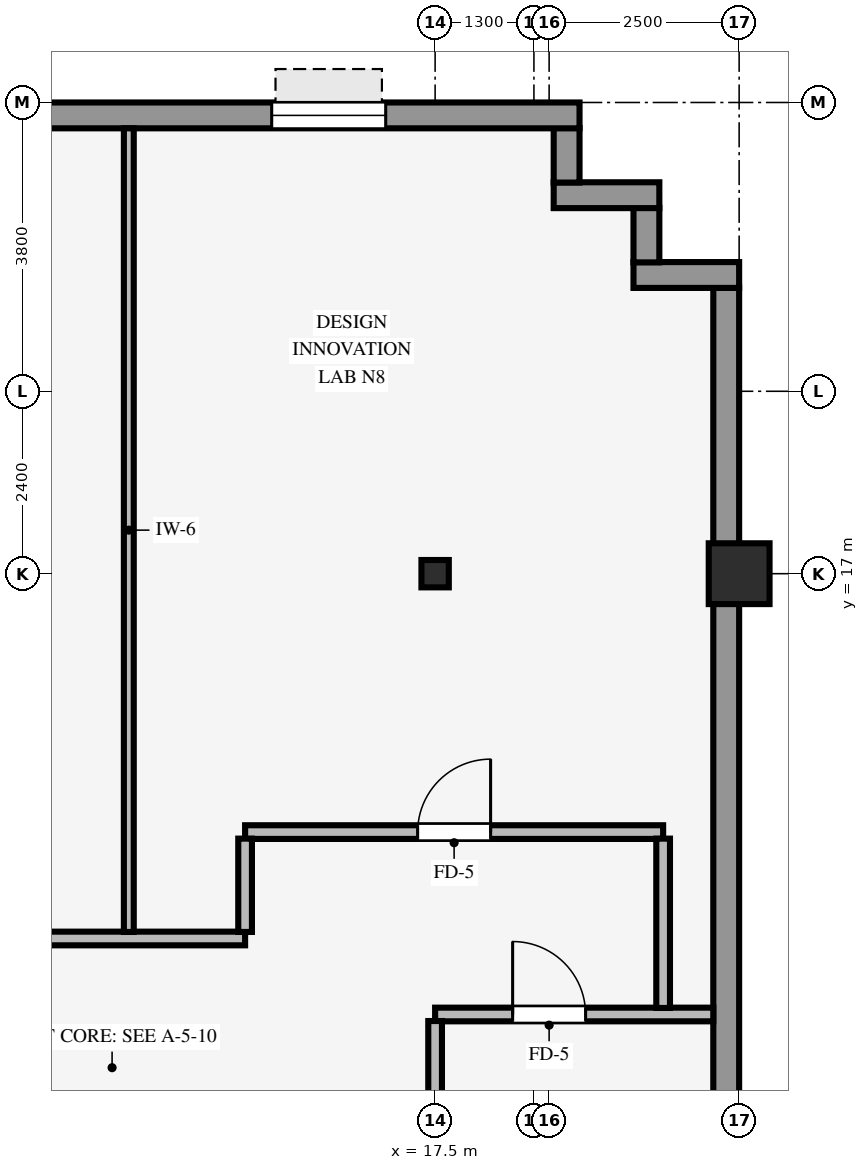
"""IFC4 building model, lengths in metres.
Left out: names, types, materials, properties, quantities, classifications, styles, units other than length and angle.
Written with IfcOpenShell. Run it as: python <this file> out.ifc"""

import sys

from ifc_helpers import new_model, si_unit, direction, frame, frame_2d, origin, origin_2d, place, context, subcontext, project, spatial, rectangle, hollow_rectangle, i_section, extrude, source, transform, mapped, element, fill, save


model = new_model("IFC4")
c1 = context("Model", 3, precision=1e-05, world=origin(), true_north=direction((0.0, 1.0)))
c2 = subcontext(c1, "Body", "Model", "MODEL_VIEW")
j1 = project(units=[si_unit("LENGTHUNIT", "METRE"), si_unit("PLANEANGLEUNIT", "RADIAN")], contexts=[c1])
p1 = place(None, origin())
s1 = spatial("IfcSite", under=j1, at=p1, CompositionType="ELEMENT")
p2 = place(p1, origin())
s2 = spatial("IfcBuilding", under=s1, at=p2, CompositionType="ELEMENT")
p3 = place(p2, frame((0.0, 0.0, 60.45)))
s3 = spatial("IfcBuildingStorey", under=s2, at=p3, CompositionType="ELEMENT", Elevation=60.45)
p4 = place(p3, frame((21.5, 17.0, 0.0), z_axis=(0.0, 0.0, 1.0), x_axis=(1.0, 0.0, 0.0)))
e1 = element("IfcColumn", 1, at=p4, inside=s3, PredefinedType="COLUMN", context=c2, shape_type="SweptSolid", body=[
    extrude(hollow_rectangle(XDim=0.8, YDim=0.8, WallThickness=0.055, InnerFilletRadius=0.055, OuterFilletRadius=0.11, at=origin_2d()), origin(), (0.0, 0.0, 1.0), 3.37),
])
p5 = place(p3, frame((17.5, 17.0, 0.0), z_axis=(0.0, 0.0, 1.0), x_axis=(1.0, 0.0, 0.0)))
e2 = element("IfcColumn", 2, at=p5, inside=s3, PredefinedType="COLUMN", context=c2, shape_type="SweptSolid", body=[
    extrude(i_section(OverallWidth=0.36, OverallDepth=0.36, WebThickness=0.021, FlangeThickness=0.021, FilletRadius=0.018, at=origin_2d()), origin(), (0.0, 0.0, 1.0), 3.37),
])
p6 = place(p3, frame((21.33, -20.764, 0.0), z_axis=(0.0, 0.0, 1.0), x_axis=(0.0, 1.0, 0.0)))
e3 = element("IfcWall", 3, at=p6, inside=s3, PredefinedType="STANDARD", context=c2, shape_type="SweptSolid", body=[
    extrude(rectangle(XDim=41.528, YDim=0.34, at=frame_2d((20.764, 0.0))), origin(), (0.0, 0.0, 1.0), 2.705),
])
p7 = place(p6, frame((12.202, 0.0, 0.8)))
e4 = element("IfcOpeningElement", 4, at=p7, cuts=e3, PredefinedType="OPENING", context=c2, shape_type="SweptSolid", body=[
    extrude(rectangle(XDim=2.3, YDim=1.62, at=frame_2d((1.15, 0.81))), frame((0.0, 0.18, 0.0), z_axis=(0.0, -1.0, 0.0), x_axis=(1.0, 0.0, 0.0)), (0.0, 0.0, 1.0), 0.36),
])
p8 = place(p6, frame((17.144, 0.0, 0.8)))
e5 = element("IfcOpeningElement", 5, at=p8, cuts=e3, PredefinedType="OPENING", context=c2, shape_type="SweptSolid", body=[
    extrude(rectangle(XDim=2.3, YDim=1.62, at=frame_2d((1.15, 0.81))), frame((0.0, 0.18, 0.0), z_axis=(0.0, -1.0, 0.0), x_axis=(1.0, 0.0, 0.0)), (0.0, 0.0, 1.0), 0.36),
])
p9 = place(p6, frame((22.084, 0.0, 0.8)))
e6 = element("IfcOpeningElement", 6, at=p9, cuts=e3, PredefinedType="OPENING", context=c2, shape_type="SweptSolid", body=[
    extrude(rectangle(XDim=2.3, YDim=1.62, at=frame_2d((1.15, 0.81))), frame((0.0, 0.18, 0.0), z_axis=(0.0, -1.0, 0.0), x_axis=(1.0, 0.0, 0.0)), (0.0, 0.0, 1.0), 0.36),
])
p10 = place(p6, frame((27.025, 0.0, 0.8)))
e7 = element("IfcOpeningElement", 7, at=p10, cuts=e3, PredefinedType="OPENING", context=c2, shape_type="SweptSolid", body=[
    extrude(rectangle(XDim=2.3, YDim=1.62, at=frame_2d((1.15, 0.81))), frame((0.0, 0.18, 0.0), z_axis=(0.0, -1.0, 0.0), x_axis=(1.0, 0.0, 0.0)), (0.0, 0.0, 1.0), 0.36),
])
p11 = place(p3, frame((20.11, 20.93, 0.0), z_axis=(0.0, 0.0, 1.0), x_axis=(1.0, 0.0, 0.0)))
e8 = element("IfcWall", 8, at=p11, inside=s3, PredefinedType="STANDARD", context=c2, shape_type="SweptSolid", body=[
    extrude(rectangle(XDim=1.39, YDim=0.34, at=frame_2d((0.695, 0.0))), origin(), (0.0, 0.0, 1.0), 3.36),
])
p12 = place(p3, frame((20.28, 21.096, 0.0), z_axis=(0.0, 0.0, 1.0), x_axis=(0.0, 1.0, 0.0)))
e9 = element("IfcWall", 9, at=p12, inside=s3, PredefinedType="STANDARD", context=c2, shape_type="SweptSolid", body=[
    extrude(rectangle(XDim=0.718, YDim=0.34, at=frame_2d((0.359, 0.0))), origin(), (0.0, 0.0, 1.0), 3.36),
])
p13 = place(p3, frame((19.06, 21.98, 0.0), z_axis=(0.0, 0.0, 1.0), x_axis=(1.0, 0.0, 0.0)))
e10 = element("IfcWall", 10, at=p13, inside=s3, PredefinedType="STANDARD", context=c2, shape_type="SweptSolid", body=[
    extrude(rectangle(XDim=1.39, YDim=0.34, at=frame_2d((0.695, 0.0))), origin(), (0.0, 0.0, 1.0), 3.36),
])
p14 = place(p3, frame((19.23, 22.146, 0.0), z_axis=(0.0, 0.0, 1.0), x_axis=(0.0, 1.0, 0.0)))
e11 = element("IfcWall", 11, at=p14, inside=s3, PredefinedType="STANDARD", context=c2, shape_type="SweptSolid", body=[
    extrude(rectangle(XDim=0.718, YDim=0.34, at=frame_2d((0.359, 0.0))), origin(), (0.0, 0.0, 1.0), 3.36),
])
p15 = place(p3, frame((-19.4, 23.03, 0.0), z_axis=(0.0, 0.0, 1.0), x_axis=(1.0, 0.0, 0.0)))
e12 = element("IfcWall", 12, at=p15, inside=s3, PredefinedType="STANDARD", context=c2, shape_type="SweptSolid", body=[
    extrude(rectangle(XDim=38.8, YDim=0.34, at=frame_2d((19.4, 0.0))), origin(), (0.0, 0.0, 1.0), 2.705),
])
p16 = place(p15, frame((1.65, 0.0, 0.8)))
e13 = element("IfcOpeningElement", 13, at=p16, cuts=e12, PredefinedType="OPENING", context=c2, shape_type="SweptSolid", body=[
    extrude(rectangle(XDim=1.5, YDim=1.6, at=frame_2d((0.75, 0.8))), frame((0.0, 0.18, 0.0), z_axis=(0.0, -1.0, 0.0), x_axis=(1.0, 0.0, 0.0)), (0.0, 0.0, 1.0), 0.36),
])
p17 = place(p15, frame((7.15, 0.0, 0.8)))
e14 = element("IfcOpeningElement", 14, at=p17, cuts=e12, PredefinedType="OPENING", context=c2, shape_type="SweptSolid", body=[
    extrude(rectangle(XDim=1.5, YDim=1.6, at=frame_2d((0.75, 0.8))), frame((0.0, 0.18, 0.0), z_axis=(0.0, -1.0, 0.0), x_axis=(1.0, 0.0, 0.0)), (0.0, 0.0, 1.0), 0.36),
])
p18 = place(p15, frame((11.75, 0.0, 0.8)))
e15 = element("IfcOpeningElement", 15, at=p18, cuts=e12, PredefinedType="OPENING", context=c2, shape_type="SweptSolid", body=[
    extrude(rectangle(XDim=1.5, YDim=1.6, at=frame_2d((0.75, 0.8))), frame((0.0, 0.18, 0.0), z_axis=(0.0, -1.0, 0.0), x_axis=(1.0, 0.0, 0.0)), (0.0, 0.0, 1.0), 0.36),
])
p19 = place(p15, frame((16.35, 0.0, 0.8)))
e16 = element("IfcOpeningElement", 16, at=p19, cuts=e12, PredefinedType="OPENING", context=c2, shape_type="SweptSolid", body=[
    extrude(rectangle(XDim=1.5, YDim=1.6, at=frame_2d((0.75, 0.8))), frame((0.0, 0.18, 0.0), z_axis=(0.0, -1.0, 0.0), x_axis=(1.0, 0.0, 0.0)), (0.0, 0.0, 1.0), 0.36),
])
p20 = place(p15, frame((20.95, 0.0, 0.8)))
e17 = element("IfcOpeningElement", 17, at=p20, cuts=e12, PredefinedType="OPENING", context=c2, shape_type="SweptSolid", body=[
    extrude(rectangle(XDim=1.5, YDim=1.6, at=frame_2d((0.75, 0.8))), frame((0.0, 0.18, 0.0), z_axis=(0.0, -1.0, 0.0), x_axis=(1.0, 0.0, 0.0)), (0.0, 0.0, 1.0), 0.36),
])
p21 = place(p15, frame((25.55, 0.0, 0.8)))
e18 = element("IfcOpeningElement", 18, at=p21, cuts=e12, PredefinedType="OPENING", context=c2, shape_type="SweptSolid", body=[
    extrude(rectangle(XDim=1.5, YDim=1.6, at=frame_2d((0.75, 0.8))), frame((0.0, 0.18, 0.0), z_axis=(0.0, -1.0, 0.0), x_axis=(1.0, 0.0, 0.0)), (0.0, 0.0, 1.0), 0.36),
])
p22 = place(p15, frame((30.15, 0.0, 0.8)))
e19 = element("IfcOpeningElement", 19, at=p22, cuts=e12, PredefinedType="OPENING", context=c2, shape_type="SweptSolid", body=[
    extrude(rectangle(XDim=1.5, YDim=1.6, at=frame_2d((0.75, 0.8))), frame((0.0, 0.18, 0.0), z_axis=(0.0, -1.0, 0.0), x_axis=(1.0, 0.0, 0.0)), (0.0, 0.0, 1.0), 0.36),
])
p23 = place(p15, frame((34.75, 0.0, 0.8)))
e20 = element("IfcOpeningElement", 20, at=p23, cuts=e12, PredefinedType="OPENING", context=c2, shape_type="SweptSolid", body=[
    extrude(rectangle(XDim=1.5, YDim=1.6, at=frame_2d((0.75, 0.8))), frame((0.0, 0.18, 0.0), z_axis=(0.0, -1.0, 0.0), x_axis=(1.0, 0.0, 0.0)), (0.0, 0.0, 1.0), 0.36),
])
p24 = place(p3, frame((17.5, 11.2, 0.0), z_axis=(0.0, 0.0, 1.0), x_axis=(1.0, 0.0, 0.0)))
e21 = element("IfcWall", 21, at=p24, inside=s3, PredefinedType="PARTITIONING", context=c2, shape_type="SweptSolid", body=[
    extrude(rectangle(XDim=3.66, YDim=0.18, at=frame_2d((1.83, 0.0))), origin(), (0.0, 0.0, 1.0), 3.36),
])
p25 = place(p24, frame((1.02, 0.0, 0.0)))
e22 = element("IfcOpeningElement", 22, at=p25, cuts=e21, PredefinedType="OPENING", context=c2, shape_type="SweptSolid", body=[
    extrude(rectangle(XDim=0.96, YDim=2.1, at=frame_2d((0.48, 1.05))), frame((0.0, 0.1, 0.0), z_axis=(0.0, -1.0, 0.0), x_axis=(1.0, 0.0, 0.0)), (0.0, 0.0, 1.0), 0.2),
])
p26 = place(p3, frame((-15.0, 12.2, 0.0), z_axis=(0.0, 0.0, 1.0), x_axis=(1.0, 0.0, 0.0)))
e23 = element("IfcWall", 23, at=p26, inside=s3, PredefinedType="PARTITIONING", context=c2, shape_type="SweptSolid", body=[
    extrude(rectangle(XDim=30.0, YDim=0.18, at=frame_2d((15.0, 0.0))), origin(), (0.0, 0.0, 1.0), 3.36),
])
p27 = place(p26, frame((2.195, 0.0, 0.0)))
e24 = element("IfcOpeningElement", 24, at=p27, cuts=e23, PredefinedType="OPENING", context=c2, shape_type="SweptSolid", body=[
    extrude(rectangle(XDim=0.96, YDim=2.1, at=frame_2d((0.48, 1.05))), frame((0.0, 0.1, 0.0), z_axis=(0.0, -1.0, 0.0), x_axis=(1.0, 0.0, 0.0)), (0.0, 0.0, 1.0), 0.2),
])
p28 = place(p26, frame((16.395, 0.0, 0.0)))
e25 = element("IfcOpeningElement", 25, at=p28, cuts=e23, PredefinedType="OPENING", context=c2, shape_type="SweptSolid", body=[
    extrude(rectangle(XDim=0.96, YDim=2.1, at=frame_2d((0.48, 1.05))), frame((0.0, 0.1, 0.0), z_axis=(0.0, -1.0, 0.0), x_axis=(1.0, 0.0, 0.0)), (0.0, 0.0, 1.0), 0.2),
])
p29 = place(p26, frame((21.62, 0.0, 0.0)))
e26 = element("IfcOpeningElement", 26, at=p29, cuts=e23, PredefinedType="OPENING", context=c2, shape_type="SweptSolid", body=[
    extrude(rectangle(XDim=0.96, YDim=2.1, at=frame_2d((0.48, 1.05))), frame((0.0, 0.1, 0.0), z_axis=(0.0, -1.0, 0.0), x_axis=(1.0, 0.0, 0.0)), (0.0, 0.0, 1.0), 0.2),
])
p30 = place(p26, frame((7.33, 0.0, 0.0)))
e27 = element("IfcOpeningElement", 27, at=p30, cuts=e23, PredefinedType="OPENING", context=c2, shape_type="SweptSolid", body=[
    extrude(rectangle(XDim=0.96, YDim=2.1, at=frame_2d((0.48, 1.05))), frame((0.0, 0.1, 0.0), z_axis=(0.0, -1.0, 0.0), x_axis=(1.0, 0.0, 0.0)), (0.0, 0.0, 1.0), 0.2),
])
p31 = place(p26, frame((26.08, 0.0, 0.0)))
e28 = element("IfcOpeningElement", 28, at=p31, cuts=e23, PredefinedType="OPENING", context=c2, shape_type="SweptSolid", body=[
    extrude(rectangle(XDim=0.96, YDim=2.1, at=frame_2d((0.48, 1.05))), frame((0.0, 0.1, 0.0), z_axis=(0.0, -1.0, 0.0), x_axis=(1.0, 0.0, 0.0)), (0.0, 0.0, 1.0), 0.2),
])
p32 = place(p26, frame((12.52, 0.0, 0.0)))
e29 = element("IfcOpeningElement", 29, at=p32, cuts=e23, PredefinedType="OPENING", context=c2, shape_type="SweptSolid", body=[
    extrude(rectangle(XDim=0.96, YDim=2.1, at=frame_2d((0.48, 1.05))), frame((0.0, 0.1, 0.0), z_axis=(0.0, -1.0, 0.0), x_axis=(1.0, 0.0, 0.0)), (0.0, 0.0, 1.0), 0.2),
])
p33 = place(p3, frame((15.0, 13.6, 0.0), z_axis=(0.0, 0.0, 1.0), x_axis=(1.0, 0.0, 0.0)))
e30 = element("IfcWall", 30, at=p33, inside=s3, PredefinedType="PARTITIONING", context=c2, shape_type="SweptSolid", body=[
    extrude(rectangle(XDim=5.5, YDim=0.18, at=frame_2d((2.75, 0.0))), origin(), (0.0, 0.0, 1.0), 2.942),
])
p34 = place(p33, frame((2.27, 0.0, 0.0)))
e31 = element("IfcOpeningElement", 31, at=p34, cuts=e30, PredefinedType="OPENING", context=c2, shape_type="SweptSolid", body=[
    extrude(rectangle(XDim=0.96, YDim=2.1, at=frame_2d((0.48, 1.05))), frame((0.0, 0.1, 0.0), z_axis=(0.0, -1.0, 0.0), x_axis=(1.0, 0.0, 0.0)), (0.0, 0.0, 1.0), 0.2),
])
p35 = place(p3, frame((13.47, 12.286, 0.0), z_axis=(0.0, 0.0, 1.0), x_axis=(0.0, 1.0, 0.0)))
e32 = element("IfcWall", 32, at=p35, inside=s3, PredefinedType="PARTITIONING", context=c2, shape_type="SweptSolid", body=[
    extrude(rectangle(XDim=10.574, YDim=0.13, at=frame_2d((5.287, 0.0))), origin(), (0.0, 0.0, 1.0), 3.36),
])
p36 = place(p3, frame((15.0, 12.286, 0.0), z_axis=(0.0, 0.0, 1.0), x_axis=(0.0, 1.0, 0.0)))
e33 = element("IfcWall", 33, at=p36, inside=s3, PredefinedType="PARTITIONING", context=c2, shape_type="SweptSolid", body=[
    extrude(rectangle(XDim=1.228, YDim=0.18, at=frame_2d((0.614, 0.0))), origin(), (0.0, 0.0, 1.0), 3.36),
])
p37 = place(p3, frame((17.5, 10.146, 0.0), z_axis=(0.0, 0.0, 1.0), x_axis=(0.0, 1.0, 0.0)))
e34 = element("IfcWall", 34, at=p37, inside=s3, PredefinedType="PARTITIONING", context=c2, shape_type="SweptSolid", body=[
    extrude(rectangle(XDim=0.968, YDim=0.18, at=frame_2d((0.484, 0.0))), origin(), (0.0, 0.0, 1.0), 2.738),
])
p38 = place(p3, frame((20.5, 11.286, 0.0), z_axis=(0.0, 0.0, 1.0), x_axis=(0.0, 1.0, 0.0)))
e35 = element("IfcWall", 35, at=p38, inside=s3, PredefinedType="PARTITIONING", context=c2, shape_type="SweptSolid", body=[
    extrude(rectangle(XDim=2.228, YDim=0.18, at=frame_2d((1.114, 0.0))), origin(), (0.0, 0.0, 1.0), 3.36),
])
m1 = source(origin(), c2, "Body", "SweptSolid", [
    extrude(rectangle(XDim=1.5, YDim=1.6, at=frame_2d((0.75, 0.8))), frame((0.0, 0.03, 0.0), z_axis=(0.0, -1.0, 0.0), x_axis=(1.0, 0.0, 0.0)), (0.0, 0.0, 1.0), 0.06),
])
p39 = place(p23, origin())
e36 = element("IfcWindow", 36, at=p39, inside=s3, PartitioningType="SINGLE_PANEL", PredefinedType="WINDOW", context=c2, shape_type="MappedRepresentation", body=[
    mapped(m1, transform((0.0, 0.0, 0.0), scale=1.0)),
])
fill(e20, e36)
m2 = source(origin(), c2, "Body", "SweptSolid", [
    extrude(rectangle(XDim=0.96, YDim=2.1, at=frame_2d((0.48, 1.05))), frame((0.0, 0.025, 0.0), z_axis=(0.0, -1.0, 0.0), x_axis=(1.0, 0.0, 0.0)), (0.0, 0.0, 1.0), 0.05),
])
p40 = place(p34, origin())
e37 = element("IfcDoor", 37, at=p40, inside=s3, OperationType="SINGLE_SWING_RIGHT", PredefinedType="DOOR", context=c2, shape_type="MappedRepresentation", body=[
    mapped(m2, transform((0.0, 0.0, 0.0), scale=1.0)),
])
fill(e31, e37)
p41 = place(p25, origin())
e38 = element("IfcDoor", 38, at=p41, inside=s3, OperationType="SINGLE_SWING_LEFT", PredefinedType="DOOR", context=c2, shape_type="MappedRepresentation", body=[
    mapped(m2, transform((0.0, 0.0, 0.0), scale=1.0)),
])
fill(e22, e38)
save(model, sys.argv[1])
